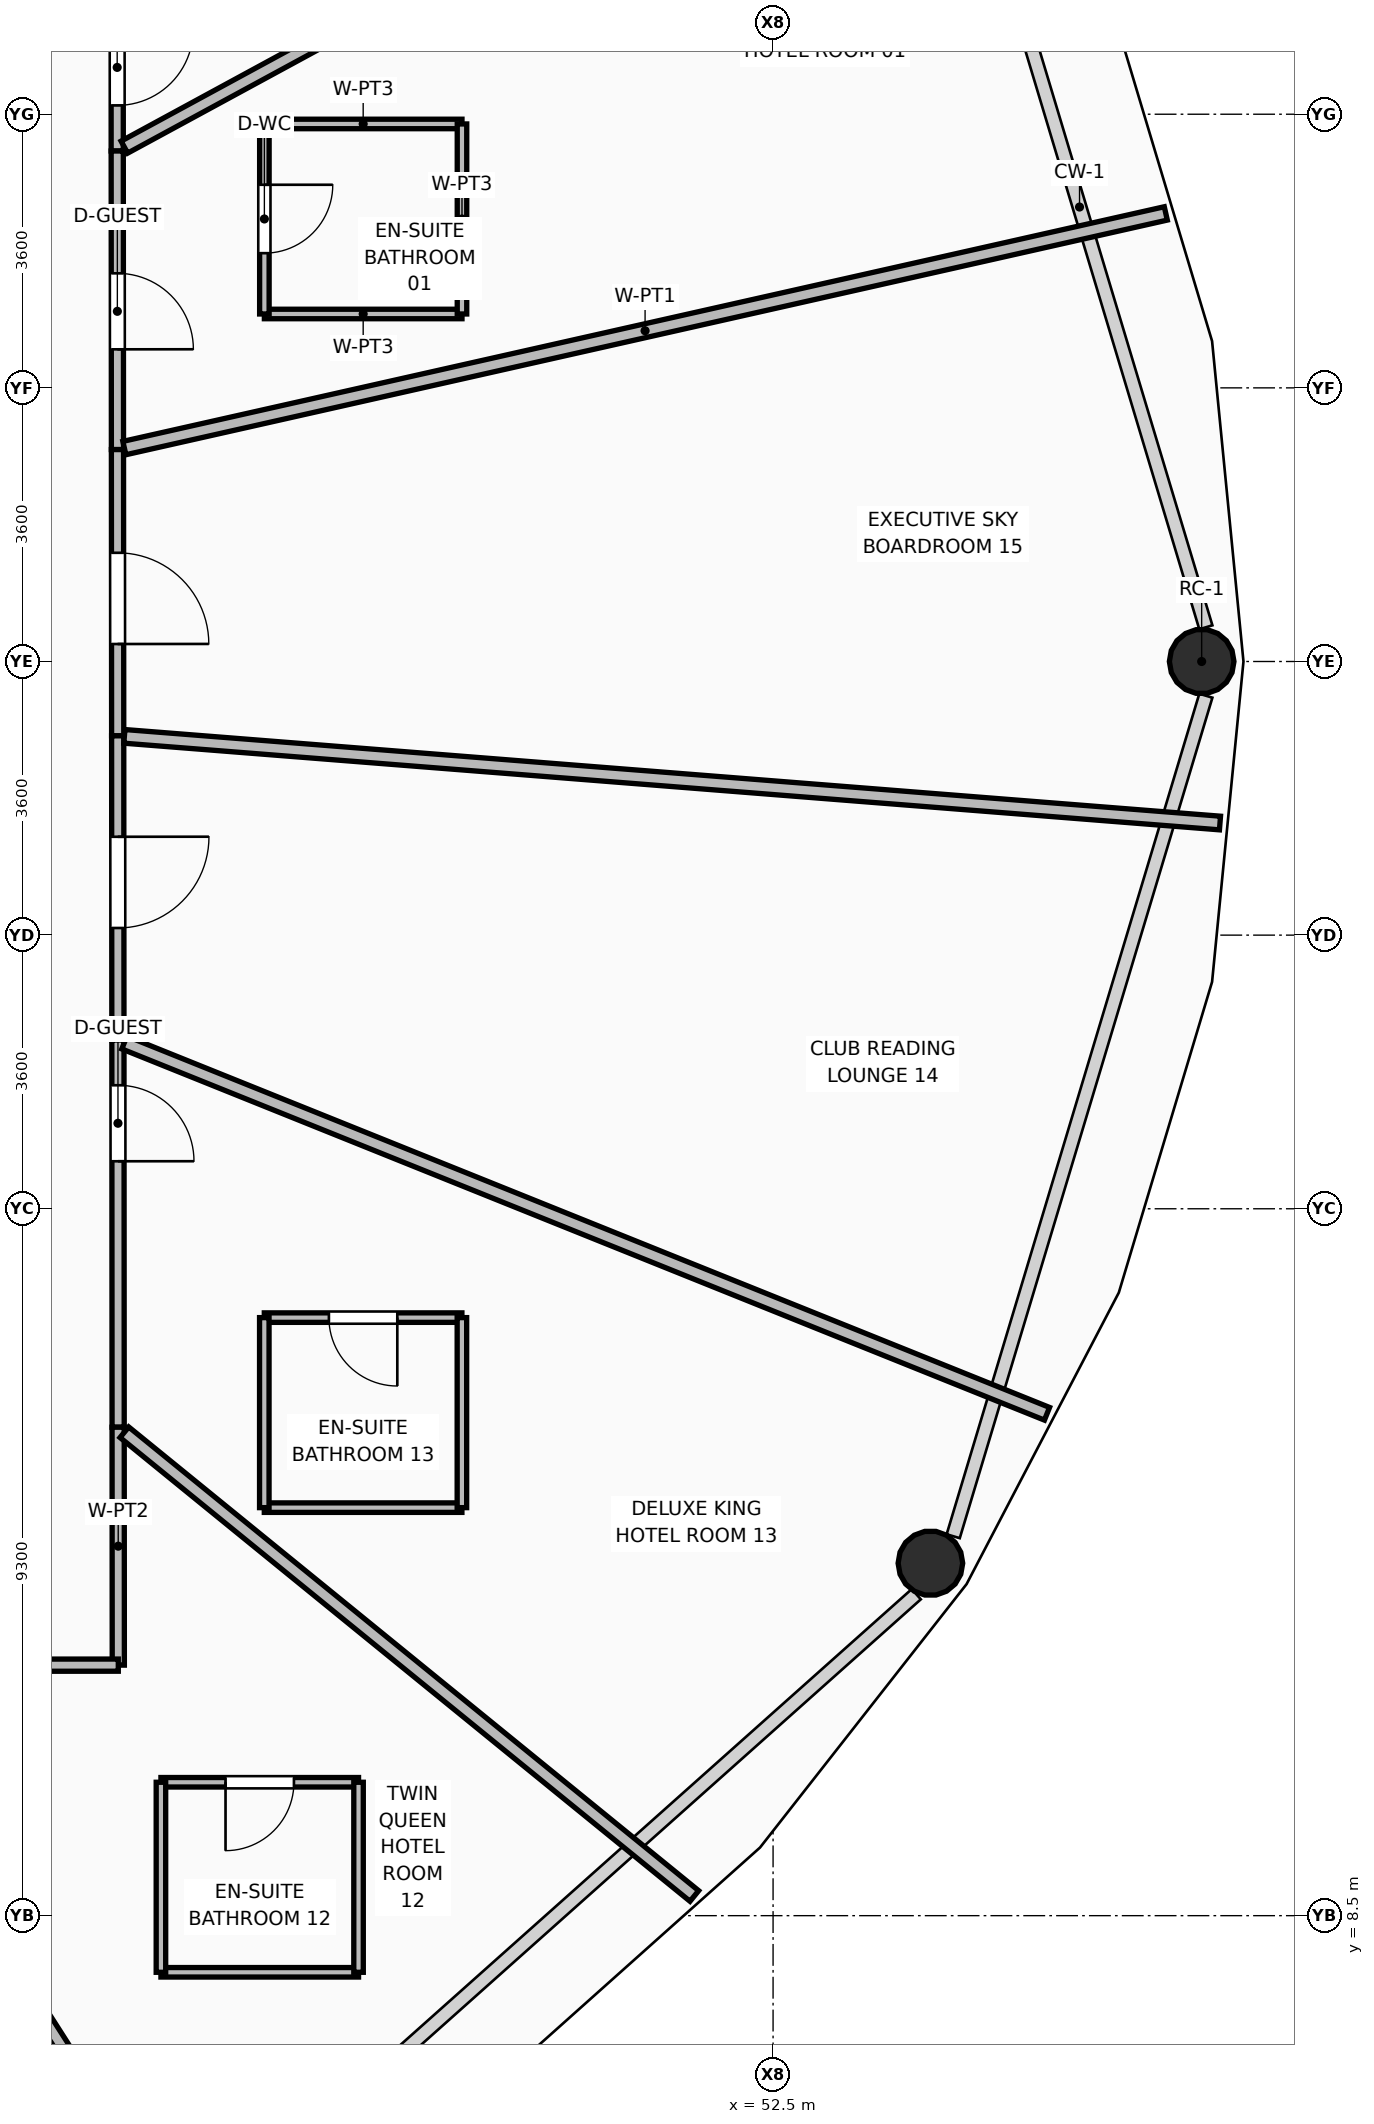
"""IFC4 building model, lengths in metres.
Left out: names, types, materials, properties, quantities, classifications, styles, units other than length and angle.
Written with IfcOpenShell. Run it as: python <this file> out.ifc"""

import sys

from ifc_helpers import new_model, si_unit, direction, frame, frame_2d, origin, origin_2d, place, context, subcontext, project, spatial, rectangle, hollow_circle, extrude, element, fill, save


model = new_model("IFC4")
c1 = context("Model", 3, precision=1e-05, world=origin(), true_north=direction((0.0, 1.0)))
c2 = subcontext(c1, "Body", "Model", "MODEL_VIEW")
j1 = project(units=[si_unit("LENGTHUNIT", "METRE"), si_unit("PLANEANGLEUNIT", "RADIAN")], contexts=[c1])
p1 = place(None, origin())
s1 = spatial("IfcSite", under=j1, at=p1, CompositionType="ELEMENT")
p2 = place(p1, origin())
s2 = spatial("IfcBuilding", under=s1, at=p2, CompositionType="ELEMENT")
p3 = place(p2, frame((0.0, 0.0, 49.5)))
s3 = spatial("IfcBuildingStorey", under=s2, at=p3, CompositionType="ELEMENT", Elevation=49.5)
for number, where, z_axis, x_axis in (
    (1, (58.139, 25.0, 0.0), (0.0, 0.0, 1.0), (1.0, 0.0, 0.0)),
    (2, (54.57, 13.137, 0.0), (0.0, 0.0, 1.0), (1.0, 0.0, 0.0)),
):
    element("IfcColumn", number, at=place(p3, frame(where, z_axis=z_axis, x_axis=x_axis)), inside=s3, PredefinedType="COLUMN", context=c2, shape_type="SweptSolid", body=[
        extrude(hollow_circle(Radius=0.425, WallThickness=0.04, at=origin_2d()), origin(), (0.0, 0.0, 1.0), 3.57),
    ])
p4 = place(p3, frame((43.869, 35.235, 0.0), z_axis=(0.0, 0.0, 1.0), x_axis=(0.00062439283, -0.999999805067, 0.0)))
e3 = element("IfcWall", 3, at=p4, inside=s3, PredefinedType="PARTITIONING", context=c2, shape_type="SweptSolid", body=[
    extrude(rectangle(XDim=3.519, YDim=0.16, at=frame_2d((1.76, 0.0))), origin(), (0.0, 0.0, 1.0), 2.928),
])
p5 = place(p4, frame((1.919, 0.0, 0.0)))
e4 = element("IfcOpeningElement", 4, at=p5, cuts=e3, PredefinedType="OPENING", context=c2, shape_type="SweptSolid", body=[
    extrude(rectangle(XDim=1.0, YDim=2.1, at=frame_2d((0.5, 1.05))), frame((0.0, 0.09, 0.0), z_axis=(0.0, -1.0, 0.0), x_axis=(1.0, 0.0, 0.0)), (0.0, 0.0, 1.0), 0.18),
])
p6 = place(p3, frame((43.871, 31.716, 0.0), z_axis=(0.0, 0.0, 1.0), x_axis=(0.000745850995, -0.999999721853, 0.0)))
e5 = element("IfcWall", 5, at=p6, inside=s3, PredefinedType="PARTITIONING", context=c2, shape_type="SweptSolid", body=[
    extrude(rectangle(XDim=3.928, YDim=0.16, at=frame_2d((1.964, 0.0))), origin(), (0.0, 0.0, 1.0), 3.55),
])
p7 = place(p6, frame((1.609, 0.0, 0.0)))
e6 = element("IfcOpeningElement", 6, at=p7, cuts=e5, PredefinedType="OPENING", context=c2, shape_type="SweptSolid", body=[
    extrude(rectangle(XDim=1.0, YDim=2.1, at=frame_2d((0.5, 1.05))), frame((0.0, 0.09, 0.0), z_axis=(0.0, -1.0, 0.0), x_axis=(1.0, 0.0, 0.0)), (0.0, 0.0, 1.0), 0.18),
])
p8 = place(p3, frame((43.874, 27.788, 0.0), z_axis=(0.0, 0.0, 1.0), x_axis=(0.000777907194, -0.99999969743, 0.0)))
e7 = element("IfcWall", 7, at=p8, inside=s3, PredefinedType="PARTITIONING", context=c2, shape_type="SweptSolid", body=[
    extrude(rectangle(XDim=3.766, YDim=0.16, at=frame_2d((1.883, 0.0))), origin(), (0.0, 0.0, 1.0), 3.55),
])
p9 = place(p8, frame((1.358, 0.0, 0.0)))
e8 = element("IfcOpeningElement", 8, at=p9, cuts=e7, PredefinedType="OPENING", context=c2, shape_type="SweptSolid", body=[
    extrude(rectangle(XDim=1.2, YDim=2.1, at=frame_2d((0.6, 1.05))), frame((0.0, 0.09, 0.0), z_axis=(0.0, -1.0, 0.0), x_axis=(1.0, 0.0, 0.0)), (0.0, 0.0, 1.0), 0.18),
])
p10 = place(p3, frame((43.877, 24.022, 0.0), z_axis=(0.0, 0.0, 1.0), x_axis=(0.000732064226, -0.999999732041, 0.0)))
e9 = element("IfcWall", 9, at=p10, inside=s3, PredefinedType="PARTITIONING", context=c2, shape_type="SweptSolid", body=[
    extrude(rectangle(XDim=4.002, YDim=0.16, at=frame_2d((2.001, 0.0))), origin(), (0.0, 0.0, 1.0), 2.928),
])
p11 = place(p10, frame((1.328, 0.0, 0.0)))
e10 = element("IfcOpeningElement", 10, at=p11, cuts=e9, PredefinedType="OPENING", context=c2, shape_type="SweptSolid", body=[
    extrude(rectangle(XDim=1.2, YDim=2.1, at=frame_2d((0.6, 1.05))), frame((0.0, 0.09, 0.0), z_axis=(0.0, -1.0, 0.0), x_axis=(1.0, 0.0, 0.0)), (0.0, 0.0, 1.0), 0.18),
])
p12 = place(p3, frame((43.88, 20.02, 0.0), z_axis=(0.0, 0.0, 1.0), x_axis=(0.000623052839, -0.999999805903, 0.0)))
e11 = element("IfcWall", 11, at=p12, inside=s3, PredefinedType="PARTITIONING", context=c2, shape_type="SweptSolid", body=[
    extrude(rectangle(XDim=5.094, YDim=0.16, at=frame_2d((2.547, 0.0))), origin(), (0.0, 0.0, 1.0), 2.928),
])
p13 = place(p12, frame((0.595, 0.0, 0.0)))
e12 = element("IfcOpeningElement", 12, at=p13, cuts=e11, PredefinedType="OPENING", context=c2, shape_type="SweptSolid", body=[
    extrude(rectangle(XDim=1.0, YDim=2.1, at=frame_2d((0.5, 1.05))), frame((0.0, 0.09, 0.0), z_axis=(0.0, -1.0, 0.0), x_axis=(1.0, 0.0, 0.0)), (0.0, 0.0, 1.0), 0.18),
])
p14 = place(p3, frame((43.883, 14.926, 0.0), z_axis=(0.0, 0.0, 1.0), x_axis=(0.000623976167, -0.999999805327, 0.0)))
e13 = element("IfcWall", 13, at=p14, inside=s3, PredefinedType="PARTITIONING", context=c2, shape_type="SweptSolid", body=[
    extrude(rectangle(XDim=3.13, YDim=0.16, at=frame_2d((1.565, 0.0))), origin(), (0.0, 0.0, 1.0), 3.55),
])
p15 = place(p3, frame((43.885, 11.796, 0.0), z_axis=(0.0, 0.0, 1.0), x_axis=(-0.999999877509, -0.000494957559, 0.0)))
e14 = element("IfcWall", 14, at=p15, inside=s3, PredefinedType="PARTITIONING", context=c2, shape_type="SweptSolid", body=[
    extrude(rectangle(XDim=3.946, YDim=0.16, at=frame_2d((1.973, 0.0))), origin(), (0.0, 0.0, 1.0), 2.928),
])
p16 = place(p15, frame((2.348, 0.0, 0.0)))
e15 = element("IfcOpeningElement", 15, at=p16, cuts=e14, PredefinedType="OPENING", context=c2, shape_type="SweptSolid", body=[
    extrude(rectangle(XDim=1.0, YDim=2.1, at=frame_2d((0.5, 1.05))), frame((0.0, 0.09, 0.0), z_axis=(0.0, -1.0, 0.0), x_axis=(1.0, 0.0, 0.0)), (0.0, 0.0, 1.0), 0.18),
])
p17 = place(p3, frame((43.965, 27.808, 0.0), z_axis=(0.0, 0.0, 1.0), x_axis=(0.975548947741, 0.219782279907, 0.0)))
e16 = element("IfcWall", 16, at=p17, inside=s3, PredefinedType="PARTITIONING", context=c2, shape_type="SweptSolid", body=[
    extrude(rectangle(XDim=14.045, YDim=0.18, at=frame_2d((7.023, 0.0))), origin(), (0.0, 0.0, 1.0), 2.775),
])
p18 = place(p3, frame((43.965, 31.767, 0.0), z_axis=(0.0, 0.0, 1.0), x_axis=(0.878834340918, 0.477127028393, 0.0)))
e17 = element("IfcWall", 17, at=p18, inside=s3, PredefinedType="PARTITIONING", context=c2, shape_type="SweptSolid", body=[
    extrude(rectangle(XDim=12.104, YDim=0.18, at=frame_2d((6.052, 0.0))), origin(), (0.0, 0.0, 1.0), 2.775),
])
p19 = place(p3, frame((39.998, 11.7, 0.0), z_axis=(0.0, 0.0, 1.0), x_axis=(0.53849796623, -0.842626809665, 0.0)))
e18 = element("IfcWall", 18, at=p19, inside=s3, PredefinedType="PARTITIONING", context=c2, shape_type="SweptSolid", body=[
    extrude(rectangle(XDim=9.127, YDim=0.18, at=frame_2d((4.563, 0.0))), origin(), (0.0, 0.0, 1.0), 2.775),
])
p20 = place(p3, frame((43.965, 14.86, 0.0), z_axis=(0.0, 0.0, 1.0), x_axis=(0.77570287791, -0.631098284899, 0.0)))
e19 = element("IfcWall", 19, at=p20, inside=s3, PredefinedType="PARTITIONING", context=c2, shape_type="SweptSolid", body=[
    extrude(rectangle(XDim=9.667, YDim=0.18, at=frame_2d((4.834, 0.0))), origin(), (0.0, 0.0, 1.0), 2.775),
])
p21 = place(p3, frame((43.965, 19.986, 0.0), z_axis=(0.0, 0.0, 1.0), x_axis=(0.927750435419, -0.373201191827, 0.0)))
e20 = element("IfcWall", 20, at=p21, inside=s3, PredefinedType="PARTITIONING", context=c2, shape_type="SweptSolid", body=[
    extrude(rectangle(XDim=13.084, YDim=0.18, at=frame_2d((6.542, 0.0))), origin(), (0.0, 0.0, 1.0), 2.775),
])
p22 = place(p3, frame((43.965, 24.015, 0.0), z_axis=(0.0, 0.0, 1.0), x_axis=(0.996887926133, -0.078831863678, 0.0)))
e21 = element("IfcWall", 21, at=p22, inside=s3, PredefinedType="PARTITIONING", context=c2, shape_type="SweptSolid", body=[
    extrude(rectangle(XDim=14.46, YDim=0.18, at=frame_2d((7.23, 0.0))), origin(), (0.0, 0.0, 1.0), 2.775),
])
for number, where, z_axis, x_axis in (
    (22, (45.807, 29.572, 0.0), (0.0, 0.0, 1.0), (1.0, 0.0, 0.0)),
    (23, (45.807, 32.072, 0.0), (0.0, 0.0, 1.0), (1.0, 0.0, 0.0)),
):
    element("IfcWall", number, at=place(p3, frame(where, z_axis=z_axis, x_axis=x_axis)), inside=s3, PredefinedType="PARTITIONING", context=c2, shape_type="SweptSolid", body=[
        extrude(rectangle(XDim=2.6, YDim=0.125, at=frame_2d((1.3, 0.0))), origin(), (0.0, 0.0, 1.0), 3.55),
    ])
p23 = place(p3, frame((45.807, 29.572, 0.0), z_axis=(0.0, 0.0, 1.0), x_axis=(0.0, 1.0, 0.0)))
e24 = element("IfcWall", 24, at=p23, inside=s3, PredefinedType="PARTITIONING", context=c2, shape_type="SweptSolid", body=[
    extrude(rectangle(XDim=2.5, YDim=0.125, at=frame_2d((1.25, 0.0))), origin(), (0.0, 0.0, 1.0), 3.55),
])
p24 = place(p23, frame((0.8, 0.0, 0.0)))
e25 = element("IfcOpeningElement", 25, at=p24, cuts=e24, PredefinedType="OPENING", context=c2, shape_type="SweptSolid", body=[
    extrude(rectangle(XDim=0.9, YDim=2.1, at=frame_2d((0.45, 1.05))), frame((0.0, 0.073, 0.0), z_axis=(0.0, -1.0, 0.0), x_axis=(1.0, 0.0, 0.0)), (0.0, 0.0, 1.0), 0.145),
])
p25 = place(p3, frame((48.407, 29.572, 0.0), z_axis=(0.0, 0.0, 1.0), x_axis=(0.0, 1.0, 0.0)))
e26 = element("IfcWall", 26, at=p25, inside=s3, PredefinedType="PARTITIONING", context=c2, shape_type="SweptSolid", body=[
    extrude(rectangle(XDim=2.5, YDim=0.125, at=frame_2d((1.25, 0.0))), origin(), (0.0, 0.0, 1.0), 3.55),
])
p26 = place(p3, frame((44.446, 7.755, 0.0), z_axis=(0.0, 0.0, 1.0), x_axis=(1.0, 0.0, 0.0)))
e27 = element("IfcWall", 27, at=p26, inside=s3, PredefinedType="PARTITIONING", context=c2, shape_type="SweptSolid", body=[
    extrude(rectangle(XDim=2.6, YDim=0.125, at=frame_2d((1.3, 0.0))), origin(), (0.0, 0.0, 1.0), 3.55),
])
p27 = place(p3, frame((44.446, 10.255, 0.0), z_axis=(0.0, 0.0, 1.0), x_axis=(1.0, 0.0, 0.0)))
e28 = element("IfcWall", 28, at=p27, inside=s3, PredefinedType="PARTITIONING", context=c2, shape_type="SweptSolid", body=[
    extrude(rectangle(XDim=2.6, YDim=0.125, at=frame_2d((1.3, 0.0))), origin(), (0.0, 0.0, 1.0), 3.55),
])
p28 = place(p27, frame((0.85, 0.0, 0.0)))
e29 = element("IfcOpeningElement", 29, at=p28, cuts=e28, PredefinedType="OPENING", context=c2, shape_type="SweptSolid", body=[
    extrude(rectangle(XDim=0.9, YDim=2.1, at=frame_2d((0.45, 1.05))), frame((0.0, 0.073, 0.0), z_axis=(0.0, -1.0, 0.0), x_axis=(1.0, 0.0, 0.0)), (0.0, 0.0, 1.0), 0.145),
])
for number, where, z_axis, x_axis in (
    (30, (44.446, 7.755, 0.0), (0.0, 0.0, 1.0), (0.0, 1.0, 0.0)),
    (31, (47.046, 7.755, 0.0), (0.0, 0.0, 1.0), (0.0, 1.0, 0.0)),
):
    element("IfcWall", number, at=place(p3, frame(where, z_axis=z_axis, x_axis=x_axis)), inside=s3, PredefinedType="PARTITIONING", context=c2, shape_type="SweptSolid", body=[
        extrude(rectangle(XDim=2.5, YDim=0.125, at=frame_2d((1.25, 0.0))), origin(), (0.0, 0.0, 1.0), 3.55),
    ])
p29 = place(p3, frame((45.806, 13.868, 0.0), z_axis=(0.0, 0.0, 1.0), x_axis=(1.0, 0.0, 0.0)))
e32 = element("IfcWall", 32, at=p29, inside=s3, PredefinedType="PARTITIONING", context=c2, shape_type="SweptSolid", body=[
    extrude(rectangle(XDim=2.6, YDim=0.125, at=frame_2d((1.3, 0.0))), origin(), (0.0, 0.0, 1.0), 3.55),
])
p30 = place(p3, frame((45.806, 16.368, 0.0), z_axis=(0.0, 0.0, 1.0), x_axis=(1.0, 0.0, 0.0)))
e33 = element("IfcWall", 33, at=p30, inside=s3, PredefinedType="PARTITIONING", context=c2, shape_type="SweptSolid", body=[
    extrude(rectangle(XDim=2.6, YDim=0.125, at=frame_2d((1.3, 0.0))), origin(), (0.0, 0.0, 1.0), 2.928),
])
p31 = place(p30, frame((0.85, 0.0, 0.0)))
e34 = element("IfcOpeningElement", 34, at=p31, cuts=e33, PredefinedType="OPENING", context=c2, shape_type="SweptSolid", body=[
    extrude(rectangle(XDim=0.9, YDim=2.1, at=frame_2d((0.45, 1.05))), frame((0.0, 0.073, 0.0), z_axis=(0.0, -1.0, 0.0), x_axis=(1.0, 0.0, 0.0)), (0.0, 0.0, 1.0), 0.145),
])
for number, where, z_axis, x_axis in (
    (35, (45.806, 13.868, 0.0), (0.0, 0.0, 1.0), (0.0, 1.0, 0.0)),
    (36, (48.406, 13.868, 0.0), (0.0, 0.0, 1.0), (0.0, 1.0, 0.0)),
):
    element("IfcWall", number, at=place(p3, frame(where, z_axis=z_axis, x_axis=x_axis)), inside=s3, PredefinedType="PARTITIONING", context=c2, shape_type="SweptSolid", body=[
        extrude(rectangle(XDim=2.5, YDim=0.125, at=frame_2d((1.25, 0.0))), origin(), (0.0, 0.0, 1.0), 2.928),
    ])
p32 = place(p24, frame((0.9, 0.0, 0.0), z_axis=(0.0, 0.0, 1.0), x_axis=(-1.0, 0.0, 0.0)))
e37 = element("IfcDoor", 37, at=p32, inside=s3, OperationType="SINGLE_SWING_LEFT", PredefinedType="DOOR", context=c2, shape_type="SweptSolid", body=[
    extrude(rectangle(XDim=0.9, YDim=2.1, at=frame_2d((0.45, 1.05))), frame((0.0, 0.025, 0.0), z_axis=(0.0, -1.0, 0.0), x_axis=(1.0, 0.0, 0.0)), (0.0, 0.0, 1.0), 0.05),
])
fill(e25, e37)
p33 = place(p7, origin())
e38 = element("IfcDoor", 38, at=p33, inside=s3, OperationType="SINGLE_SWING_RIGHT", PredefinedType="DOOR", context=c2, shape_type="SweptSolid", body=[
    extrude(rectangle(XDim=1.0, YDim=2.1, at=frame_2d((0.5, 1.05))), frame((0.0, 0.025, 0.0), z_axis=(0.0, -1.0, 0.0), x_axis=(1.0, 0.0, 0.0)), (0.0, 0.0, 1.0), 0.05),
])
fill(e6, e38)
p34 = place(p5, origin())
e39 = element("IfcDoor", 39, at=p34, inside=s3, OperationType="SINGLE_SWING_LEFT", PredefinedType="DOOR", context=c2, shape_type="SweptSolid", body=[
    extrude(rectangle(XDim=1.0, YDim=2.1, at=frame_2d((0.5, 1.05))), frame((0.0, 0.025, 0.0), z_axis=(0.0, -1.0, 0.0), x_axis=(1.0, 0.0, 0.0)), (0.0, 0.0, 1.0), 0.05),
])
fill(e4, e39)
p35 = place(p28, frame((0.9, 0.0, 0.0), z_axis=(0.0, 0.0, 1.0), x_axis=(-1.0, 0.0, 0.0)))
e40 = element("IfcDoor", 40, at=p35, inside=s3, OperationType="SINGLE_SWING_RIGHT", PredefinedType="DOOR", context=c2, shape_type="SweptSolid", body=[
    extrude(rectangle(XDim=0.9, YDim=2.1, at=frame_2d((0.45, 1.05))), frame((0.0, 0.025, 0.0), z_axis=(0.0, -1.0, 0.0), x_axis=(1.0, 0.0, 0.0)), (0.0, 0.0, 1.0), 0.05),
])
fill(e29, e40)
p36 = place(p31, frame((0.9, 0.0, 0.0), z_axis=(0.0, 0.0, 1.0), x_axis=(-1.0, 0.0, 0.0)))
e41 = element("IfcDoor", 41, at=p36, inside=s3, OperationType="SINGLE_SWING_LEFT", PredefinedType="DOOR", context=c2, shape_type="SweptSolid", body=[
    extrude(rectangle(XDim=0.9, YDim=2.1, at=frame_2d((0.45, 1.05))), frame((0.0, 0.025, 0.0), z_axis=(0.0, -1.0, 0.0), x_axis=(1.0, 0.0, 0.0)), (0.0, 0.0, 1.0), 0.05),
])
fill(e34, e41)
p37 = place(p13, origin())
e42 = element("IfcDoor", 42, at=p37, inside=s3, OperationType="SINGLE_SWING_RIGHT", PredefinedType="DOOR", context=c2, shape_type="SweptSolid", body=[
    extrude(rectangle(XDim=1.0, YDim=2.1, at=frame_2d((0.5, 1.05))), frame((0.0, 0.025, 0.0), z_axis=(0.0, -1.0, 0.0), x_axis=(1.0, 0.0, 0.0)), (0.0, 0.0, 1.0), 0.05),
])
fill(e12, e42)
p38 = place(p11, origin())
e43 = element("IfcDoor", 43, at=p38, inside=s3, OperationType="SINGLE_SWING_LEFT", PredefinedType="DOOR", context=c2, shape_type="SweptSolid", body=[
    extrude(rectangle(XDim=1.2, YDim=2.1, at=frame_2d((0.6, 1.05))), frame((0.0, 0.025, 0.0), z_axis=(0.0, -1.0, 0.0), x_axis=(1.0, 0.0, 0.0)), (0.0, 0.0, 1.0), 0.05),
])
fill(e10, e43)
p39 = place(p9, origin())
e44 = element("IfcDoor", 44, at=p39, inside=s3, OperationType="SINGLE_SWING_RIGHT", PredefinedType="DOOR", context=c2, shape_type="SweptSolid", body=[
    extrude(rectangle(XDim=1.2, YDim=2.1, at=frame_2d((0.6, 1.05))), frame((0.0, 0.025, 0.0), z_axis=(0.0, -1.0, 0.0), x_axis=(1.0, 0.0, 0.0)), (0.0, 0.0, 1.0), 0.05),
])
fill(e8, e44)
save(model, sys.argv[1])
